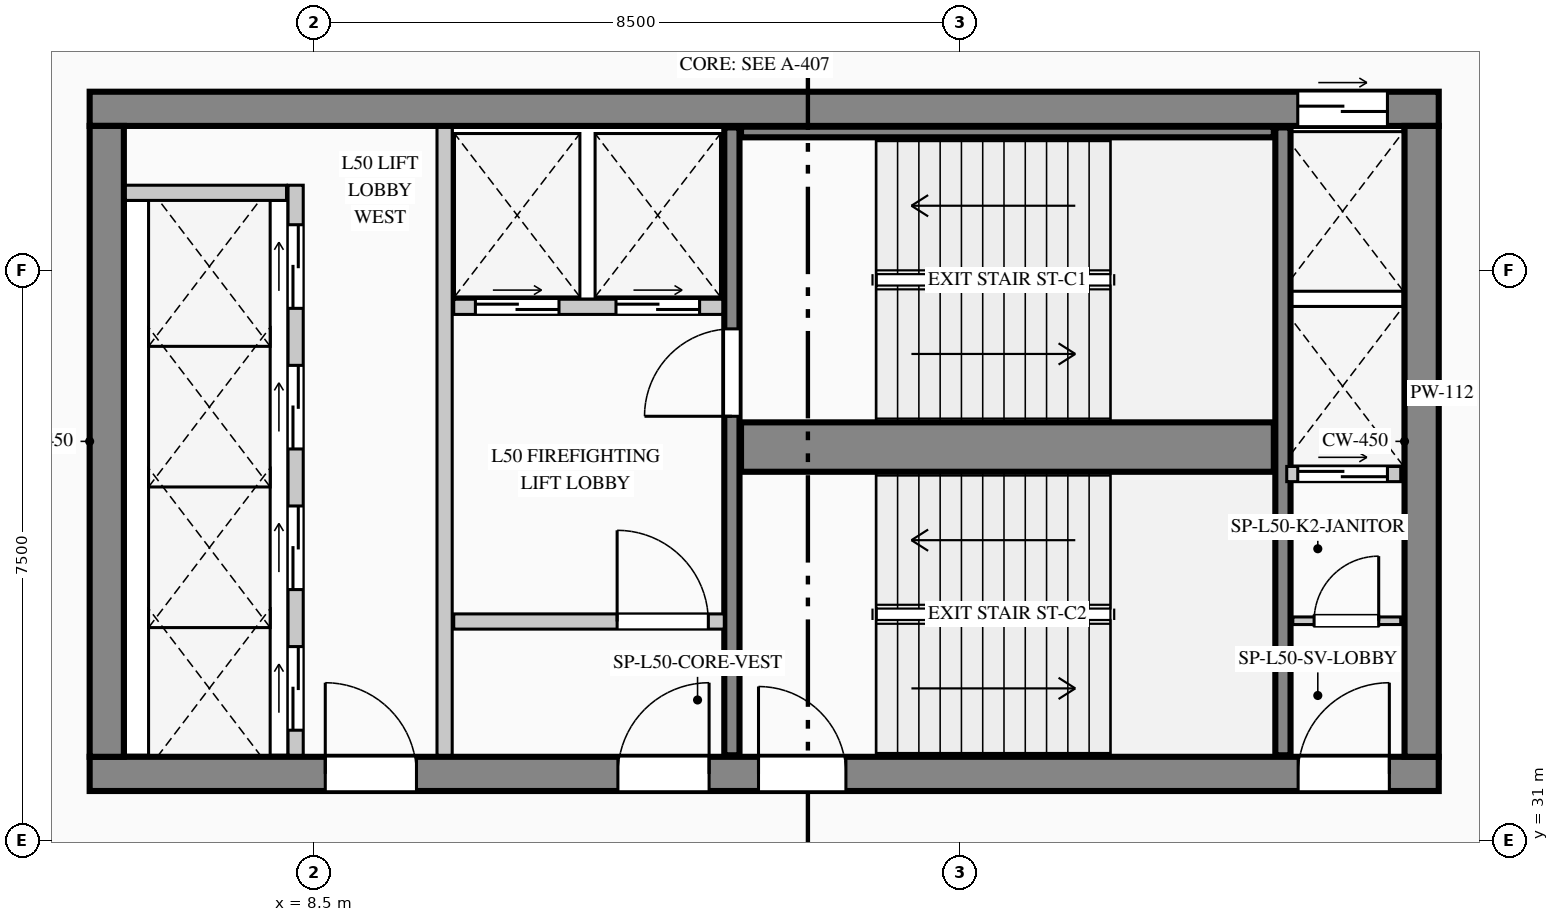
"""IFC4 building model, lengths in metres.
Left out: names, types, materials, properties, quantities, classifications, styles, units other than length and angle.
Written with IfcOpenShell. Run it as: python <this file> out.ifc"""

import sys

from ifc_helpers import new_model, si_unit, direction, frame, frame_2d, origin, place, context, subcontext, project, spatial, rectangle, extrude, element, fill, save


model = new_model("IFC4")
c1 = context("Model", 3, precision=1e-05, world=origin(), true_north=direction((0.0, 1.0)))
c2 = subcontext(c1, "Body", "Model", "MODEL_VIEW")
j1 = project(units=[si_unit("LENGTHUNIT", "METRE"), si_unit("PLANEANGLEUNIT", "RADIAN")], contexts=[c1])
p1 = place(None, origin())
s1 = spatial("IfcSite", under=j1, at=p1, CompositionType="ELEMENT")
p2 = place(p1, origin())
s2 = spatial("IfcBuilding", under=s1, at=p2, CompositionType="ELEMENT")
p3 = place(p2, frame((0.0, 0.0, 211.4)))
s3 = spatial("IfcBuildingStorey", under=s2, at=p3, CompositionType="ELEMENT", Elevation=211.4)
p4 = place(p3, frame((5.55, 40.625, 0.0), z_axis=(0.0, 0.0, 1.0), x_axis=(1.0, 0.0, 0.0)))
e1 = element("IfcWall", 1, at=p4, inside=s3, PredefinedType="SHEAR", context=c2, shape_type="SweptSolid", body=[
    extrude(rectangle(XDim=17.75, YDim=0.45, at=frame_2d((8.875, 0.0))), origin(), (0.0, 0.0, 1.0), 3.95),
])
p5 = place(p4, frame((15.895, 0.0, 0.0)))
e2 = element("IfcOpeningElement", 2, at=p5, cuts=e1, PredefinedType="OPENING", context=c2, shape_type="SweptSolid", body=[
    extrude(rectangle(XDim=1.18, YDim=2.25, at=frame_2d((0.59, 1.125))), frame((0.0, 0.235, 0.0), z_axis=(0.0, -1.0, 0.0), x_axis=(1.0, 0.0, 0.0)), (0.0, 0.0, 1.0), 0.47),
])
p6 = place(p3, frame((5.55, 31.875, 0.0), z_axis=(0.0, 0.0, 1.0), x_axis=(1.0, 0.0, 0.0)))
e3 = element("IfcWall", 3, at=p6, inside=s3, PredefinedType="SHEAR", context=c2, shape_type="SweptSolid", body=[
    extrude(rectangle(XDim=17.75, YDim=0.45, at=frame_2d((8.875, 0.0))), origin(), (0.0, 0.0, 1.0), 3.95),
])
p7 = place(p6, frame((3.1, 0.0, 0.0)))
e4 = element("IfcOpeningElement", 4, at=p7, cuts=e3, PredefinedType="OPENING", context=c2, shape_type="SweptSolid", body=[
    extrude(rectangle(XDim=1.2, YDim=2.2, at=frame_2d((0.6, 1.1))), frame((0.0, 0.235, 0.0), z_axis=(0.0, -1.0, 0.0), x_axis=(1.0, 0.0, 0.0)), (0.0, 0.0, 1.0), 0.47),
])
p8 = place(p6, frame((6.95, 0.0, 0.0)))
e5 = element("IfcOpeningElement", 5, at=p8, cuts=e3, PredefinedType="OPENING", context=c2, shape_type="SweptSolid", body=[
    extrude(rectangle(XDim=1.2, YDim=2.2, at=frame_2d((0.6, 1.1))), frame((0.0, 0.235, 0.0), z_axis=(0.0, -1.0, 0.0), x_axis=(1.0, 0.0, 0.0)), (0.0, 0.0, 1.0), 0.47),
])
p9 = place(p6, frame((8.8, 0.0, 0.0)))
e6 = element("IfcOpeningElement", 6, at=p9, cuts=e3, PredefinedType="OPENING", context=c2, shape_type="SweptSolid", body=[
    extrude(rectangle(XDim=1.15, YDim=2.2, at=frame_2d((0.575, 1.1))), frame((0.0, 0.235, 0.0), z_axis=(0.0, -1.0, 0.0), x_axis=(1.0, 0.0, 0.0)), (0.0, 0.0, 1.0), 0.47),
])
p10 = place(p6, frame((15.9, 0.0, 0.0)))
e7 = element("IfcOpeningElement", 7, at=p10, cuts=e3, PredefinedType="OPENING", context=c2, shape_type="SweptSolid", body=[
    extrude(rectangle(XDim=1.2, YDim=2.2, at=frame_2d((0.6, 1.1))), frame((0.0, 0.235, 0.0), z_axis=(0.0, -1.0, 0.0), x_axis=(1.0, 0.0, 0.0)), (0.0, 0.0, 1.0), 0.47),
])
for number, where, z_axis, x_axis in (
    (8, (5.775, 32.1, 0.0), (0.0, 0.0, 1.0), (0.0, 1.0, 0.0)),
    (9, (23.075, 32.1, 0.0), (0.0, 0.0, 1.0), (0.0, 1.0, 0.0)),
):
    element("IfcWall", number, at=place(p3, frame(where, z_axis=z_axis, x_axis=x_axis)), inside=s3, PredefinedType="SHEAR", context=c2, shape_type="SweptSolid", body=[
        extrude(rectangle(XDim=8.3, YDim=0.45, at=frame_2d((4.15, 0.0))), origin(), (0.0, 0.0, 1.0), 3.95),
    ])
p11 = place(p3, frame((14.0, 32.12, 0.0), z_axis=(0.0, 0.0, 1.0), x_axis=(0.0, 1.0, 0.0)))
e10 = element("IfcWall", 10, at=p11, inside=s3, PredefinedType="SHEAR", context=c2, shape_type="SweptSolid", body=[
    extrude(rectangle(XDim=8.26, YDim=0.2, at=frame_2d((4.13, 0.0))), origin(), (0.0, 0.0, 1.0), 3.95),
])
p12 = place(p11, frame((4.46, 0.0, 0.0)))
e11 = element("IfcOpeningElement", 11, at=p12, cuts=e10, PredefinedType="OPENING", context=c2, shape_type="SweptSolid", body=[
    extrude(rectangle(XDim=1.15, YDim=2.2, at=frame_2d((0.575, 1.1))), frame((0.0, 0.11, 0.0), z_axis=(0.0, -1.0, 0.0), x_axis=(1.0, 0.0, 0.0)), (0.0, 0.0, 1.0), 0.22),
])
p13 = place(p3, frame((14.12, 36.175, 0.0), z_axis=(0.0, 0.0, 1.0), x_axis=(1.0, 0.0, 0.0)))
e12 = element("IfcWall", 12, at=p13, inside=s3, PredefinedType="SHEAR", context=c2, shape_type="SweptSolid", body=[
    extrude(rectangle(XDim=7.01, YDim=0.65, at=frame_2d((3.505, 0.0))), origin(), (0.0, 0.0, 1.0), 3.95),
])
p14 = place(p3, frame((21.25, 32.12, 0.0), z_axis=(0.0, 0.0, 1.0), x_axis=(0.0, 1.0, 0.0)))
e13 = element("IfcWall", 13, at=p14, inside=s3, PredefinedType="SHEAR", context=c2, shape_type="SweptSolid", body=[
    extrude(rectangle(XDim=8.26, YDim=0.2, at=frame_2d((4.13, 0.0))), origin(), (0.0, 0.0, 1.0), 3.95),
])
p15 = place(p3, frame((14.12, 40.32, 0.0), z_axis=(0.0, 0.0, 1.0), x_axis=(1.0, 0.0, 0.0)))
e14 = element("IfcWall", 14, at=p15, inside=s3, PredefinedType="SHEAR", context=c2, shape_type="SweptSolid", body=[
    extrude(rectangle(XDim=7.01, YDim=0.14, at=frame_2d((3.505, 0.0))), origin(), (0.0, 0.0, 1.0), 3.95),
])
p16 = place(p3, frame((7.46, 4.62, 0.0), z_axis=(0.0, 0.0, 1.0), x_axis=(-0.123515576323, 0.992342633573, 0.0)))
e15 = element("IfcWall", 15, at=p16, inside=s3, PredefinedType="STANDARD", context=c2, shape_type="SweptSolid", body=[
    extrude(rectangle(XDim=37.043, YDim=0.24, at=frame_2d((18.522, 0.0))), origin(), (0.0, 0.0, 1.0), 3.7),
])
p17 = place(p16, frame((10.032, 0.0, 0.9)))
e16 = element("IfcOpeningElement", 16, at=p17, cuts=e15, PredefinedType="OPENING", context=c2, shape_type="SweptSolid", body=[
    extrude(rectangle(XDim=2.7, YDim=2.1, at=frame_2d((1.35, 1.05))), frame((0.0, 0.13, 0.0), z_axis=(0.0, -1.0, 0.0), x_axis=(1.0, 0.0, 0.0)), (0.0, 0.0, 1.0), 0.26),
])
p18 = place(p3, frame((8.26, 32.12, 0.0), z_axis=(0.0, 0.0, 1.0), x_axis=(0.0, 1.0, 0.0)))
e17 = element("IfcWall", 17, at=p18, inside=s3, PredefinedType="PARTITIONING", context=c2, shape_type="SweptSolid", body=[
    extrude(rectangle(XDim=7.5, YDim=0.2, at=frame_2d((3.75, 0.0))), origin(), (0.0, 0.0, 1.0), 3.7),
])
p19 = place(p18, frame((0.33, 0.0, 0.0)))
e18 = element("IfcOpeningElement", 18, at=p19, cuts=e17, PredefinedType="OPENING", context=c2, shape_type="SweptSolid", body=[
    extrude(rectangle(XDim=1.1, YDim=2.2, at=frame_2d((0.55, 1.1))), frame((0.0, 0.11, 0.0), z_axis=(0.0, -1.0, 0.0), x_axis=(1.0, 0.0, 0.0)), (0.0, 0.0, 1.0), 0.22),
])
p20 = place(p18, frame((2.18, 0.0, 0.0)))
e19 = element("IfcOpeningElement", 19, at=p20, cuts=e17, PredefinedType="OPENING", context=c2, shape_type="SweptSolid", body=[
    extrude(rectangle(XDim=1.1, YDim=2.2, at=frame_2d((0.55, 1.1))), frame((0.0, 0.11, 0.0), z_axis=(0.0, -1.0, 0.0), x_axis=(1.0, 0.0, 0.0)), (0.0, 0.0, 1.0), 0.22),
])
p21 = place(p18, frame((4.03, 0.0, 0.0)))
e20 = element("IfcOpeningElement", 20, at=p21, cuts=e17, PredefinedType="OPENING", context=c2, shape_type="SweptSolid", body=[
    extrude(rectangle(XDim=1.1, YDim=2.2, at=frame_2d((0.55, 1.1))), frame((0.0, 0.11, 0.0), z_axis=(0.0, -1.0, 0.0), x_axis=(1.0, 0.0, 0.0)), (0.0, 0.0, 1.0), 0.22),
])
p22 = place(p18, frame((5.88, 0.0, 0.0)))
e21 = element("IfcOpeningElement", 21, at=p22, cuts=e17, PredefinedType="OPENING", context=c2, shape_type="SweptSolid", body=[
    extrude(rectangle(XDim=1.1, YDim=2.2, at=frame_2d((0.55, 1.1))), frame((0.0, 0.11, 0.0), z_axis=(0.0, -1.0, 0.0), x_axis=(1.0, 0.0, 0.0)), (0.0, 0.0, 1.0), 0.22),
])
p23 = place(p3, frame((6.02, 39.52, 0.0), z_axis=(0.0, 0.0, 1.0), x_axis=(1.0, 0.0, 0.0)))
e22 = element("IfcWall", 22, at=p23, inside=s3, PredefinedType="PARTITIONING", context=c2, shape_type="SweptSolid", body=[
    extrude(rectangle(XDim=2.12, YDim=0.2, at=frame_2d((1.06, 0.0))), origin(), (0.0, 0.0, 1.0), 3.7),
])
p24 = place(p3, frame((10.22, 32.12, 0.0), z_axis=(0.0, 0.0, 1.0), x_axis=(0.0, 1.0, 0.0)))
e23 = element("IfcWall", 23, at=p24, inside=s3, PredefinedType="PARTITIONING", context=c2, shape_type="SweptSolid", body=[
    extrude(rectangle(XDim=8.26, YDim=0.2, at=frame_2d((4.13, 0.0))), origin(), (0.0, 0.0, 1.0), 3.7),
])
p25 = place(p3, frame((10.34, 38.02, 0.0), z_axis=(0.0, 0.0, 1.0), x_axis=(1.0, 0.0, 0.0)))
e24 = element("IfcWall", 24, at=p25, inside=s3, PredefinedType="PARTITIONING", context=c2, shape_type="SweptSolid", body=[
    extrude(rectangle(XDim=3.54, YDim=0.2, at=frame_2d((1.77, 0.0))), origin(), (0.0, 0.0, 1.0), 3.7),
])
p26 = place(p25, frame((0.285, 0.0, 0.0)))
e25 = element("IfcOpeningElement", 25, at=p26, cuts=e24, PredefinedType="OPENING", context=c2, shape_type="SweptSolid", body=[
    extrude(rectangle(XDim=1.1, YDim=2.2, at=frame_2d((0.55, 1.1))), frame((0.0, 0.11, 0.0), z_axis=(0.0, -1.0, 0.0), x_axis=(1.0, 0.0, 0.0)), (0.0, 0.0, 1.0), 0.22),
])
p27 = place(p25, frame((2.135, 0.0, 0.0)))
e26 = element("IfcOpeningElement", 26, at=p27, cuts=e24, PredefinedType="OPENING", context=c2, shape_type="SweptSolid", body=[
    extrude(rectangle(XDim=1.1, YDim=2.2, at=frame_2d((0.55, 1.1))), frame((0.0, 0.11, 0.0), z_axis=(0.0, -1.0, 0.0), x_axis=(1.0, 0.0, 0.0)), (0.0, 0.0, 1.0), 0.22),
])
p28 = place(p3, frame((10.34, 33.88, 0.0), z_axis=(0.0, 0.0, 1.0), x_axis=(1.0, 0.0, 0.0)))
e27 = element("IfcWall", 27, at=p28, inside=s3, PredefinedType="PARTITIONING", context=c2, shape_type="SweptSolid", body=[
    extrude(rectangle(XDim=3.56, YDim=0.2, at=frame_2d((1.78, 0.0))), origin(), (0.0, 0.0, 1.0), 3.7),
])
p29 = place(p28, frame((2.15, 0.0, 0.0)))
e28 = element("IfcOpeningElement", 28, at=p29, cuts=e27, PredefinedType="OPENING", context=c2, shape_type="SweptSolid", body=[
    extrude(rectangle(XDim=1.2, YDim=2.2, at=frame_2d((0.6, 1.1))), frame((0.0, 0.11, 0.0), z_axis=(0.0, -1.0, 0.0), x_axis=(1.0, 0.0, 0.0)), (0.0, 0.0, 1.0), 0.22),
])
p30 = place(p3, frame((21.38, 33.89, 0.0), z_axis=(0.0, 0.0, 1.0), x_axis=(1.0, 0.0, 0.0)))
e29 = element("IfcWall", 29, at=p30, inside=s3, PredefinedType="PARTITIONING", context=c2, shape_type="SweptSolid", body=[
    extrude(rectangle(XDim=1.42, YDim=0.1, at=frame_2d((0.71, 0.0))), origin(), (0.0, 0.0, 1.0), 3.7),
])
p31 = place(p30, frame((0.28, 0.0, 0.0)))
e30 = element("IfcOpeningElement", 30, at=p31, cuts=e29, PredefinedType="OPENING", context=c2, shape_type="SweptSolid", body=[
    extrude(rectangle(XDim=0.85, YDim=2.1, at=frame_2d((0.425, 1.05))), frame((0.0, 0.06, 0.0), z_axis=(0.0, -1.0, 0.0), x_axis=(1.0, 0.0, 0.0)), (0.0, 0.0, 1.0), 0.12),
])
p32 = place(p3, frame((21.3, 35.82, 0.0), z_axis=(0.0, 0.0, 1.0), x_axis=(1.0, 0.0, 0.0)))
e31 = element("IfcWall", 31, at=p32, inside=s3, PredefinedType="PARTITIONING", context=c2, shape_type="SweptSolid", body=[
    extrude(rectangle(XDim=1.5, YDim=0.2, at=frame_2d((0.75, 0.0))), origin(), (0.0, 0.0, 1.0), 3.7),
])
p33 = place(p32, frame((0.145, 0.0, 0.0)))
e32 = element("IfcOpeningElement", 32, at=p33, cuts=e31, PredefinedType="OPENING", context=c2, shape_type="SweptSolid", body=[
    extrude(rectangle(XDim=1.18, YDim=2.25, at=frame_2d((0.59, 1.125))), frame((0.0, 0.11, 0.0), z_axis=(0.0, -1.0, 0.0), x_axis=(1.0, 0.0, 0.0)), (0.0, 0.0, 1.0), 0.22),
])
p34 = place(p7, origin())
e33 = element("IfcDoor", 33, at=p34, inside=s3, OperationType="SINGLE_SWING_LEFT", PredefinedType="DOOR", context=c2, shape_type="SweptSolid", body=[
    extrude(rectangle(XDim=1.2, YDim=2.2, at=frame_2d((0.6, 1.1))), frame((0.0, 0.025, 0.0), z_axis=(0.0, -1.0, 0.0), x_axis=(1.0, 0.0, 0.0)), (0.0, 0.0, 1.0), 0.05),
])
fill(e4, e33)
p35 = place(p8, origin())
e34 = element("IfcDoor", 34, at=p35, inside=s3, OperationType="SINGLE_SWING_RIGHT", PredefinedType="DOOR", context=c2, shape_type="SweptSolid", body=[
    extrude(rectangle(XDim=1.2, YDim=2.2, at=frame_2d((0.6, 1.1))), frame((0.0, 0.025, 0.0), z_axis=(0.0, -1.0, 0.0), x_axis=(1.0, 0.0, 0.0)), (0.0, 0.0, 1.0), 0.05),
])
fill(e5, e34)
p36 = place(p9, origin())
e35 = element("IfcDoor", 35, at=p36, inside=s3, OperationType="SINGLE_SWING_LEFT", PredefinedType="DOOR", context=c2, shape_type="SweptSolid", body=[
    extrude(rectangle(XDim=1.15, YDim=2.2, at=frame_2d((0.575, 1.1))), frame((0.0, 0.025, 0.0), z_axis=(0.0, -1.0, 0.0), x_axis=(1.0, 0.0, 0.0)), (0.0, 0.0, 1.0), 0.05),
])
fill(e6, e35)
p37 = place(p10, origin())
e36 = element("IfcDoor", 36, at=p37, inside=s3, OperationType="SINGLE_SWING_RIGHT", PredefinedType="DOOR", context=c2, shape_type="SweptSolid", body=[
    extrude(rectangle(XDim=1.2, YDim=2.2, at=frame_2d((0.6, 1.1))), frame((0.0, 0.025, 0.0), z_axis=(0.0, -1.0, 0.0), x_axis=(1.0, 0.0, 0.0)), (0.0, 0.0, 1.0), 0.05),
])
fill(e7, e36)
p38 = place(p29, origin())
e37 = element("IfcDoor", 37, at=p38, inside=s3, OperationType="SINGLE_SWING_LEFT", PredefinedType="DOOR", context=c2, shape_type="SweptSolid", body=[
    extrude(rectangle(XDim=1.2, YDim=2.2, at=frame_2d((0.6, 1.1))), frame((0.0, 0.025, 0.0), z_axis=(0.0, -1.0, 0.0), x_axis=(1.0, 0.0, 0.0)), (0.0, 0.0, 1.0), 0.05),
])
fill(e28, e37)
p39 = place(p31, origin())
e38 = element("IfcDoor", 38, at=p39, inside=s3, OperationType="SINGLE_SWING_RIGHT", PredefinedType="DOOR", context=c2, shape_type="SweptSolid", body=[
    extrude(rectangle(XDim=0.85, YDim=2.1, at=frame_2d((0.425, 1.05))), frame((0.0, 0.025, 0.0), z_axis=(0.0, -1.0, 0.0), x_axis=(1.0, 0.0, 0.0)), (0.0, 0.0, 1.0), 0.05),
])
fill(e30, e38)
p40 = place(p12, origin())
e39 = element("IfcDoor", 39, at=p40, inside=s3, OperationType="SINGLE_SWING_LEFT", PredefinedType="DOOR", context=c2, shape_type="SweptSolid", body=[
    extrude(rectangle(XDim=1.15, YDim=2.2, at=frame_2d((0.575, 1.1))), frame((0.0, 0.025, 0.0), z_axis=(0.0, -1.0, 0.0), x_axis=(1.0, 0.0, 0.0)), (0.0, 0.0, 1.0), 0.05),
])
fill(e11, e39)
p41 = place(p19, origin())
e40 = element("IfcDoor", 40, at=p41, inside=s3, OperationType="DOUBLE_DOOR_SLIDING", PredefinedType="DOOR", context=c2, shape_type="SweptSolid", body=[
    extrude(rectangle(XDim=1.1, YDim=2.2, at=frame_2d((0.55, 1.1))), frame((0.0, 0.025, 0.0), z_axis=(0.0, -1.0, 0.0), x_axis=(1.0, 0.0, 0.0)), (0.0, 0.0, 1.0), 0.05),
])
fill(e18, e40)
p42 = place(p20, origin())
e41 = element("IfcDoor", 41, at=p42, inside=s3, OperationType="DOUBLE_DOOR_SLIDING", PredefinedType="DOOR", context=c2, shape_type="SweptSolid", body=[
    extrude(rectangle(XDim=1.1, YDim=2.2, at=frame_2d((0.55, 1.1))), frame((0.0, 0.025, 0.0), z_axis=(0.0, -1.0, 0.0), x_axis=(1.0, 0.0, 0.0)), (0.0, 0.0, 1.0), 0.05),
])
fill(e19, e41)
p43 = place(p21, origin())
e42 = element("IfcDoor", 42, at=p43, inside=s3, OperationType="DOUBLE_DOOR_SLIDING", PredefinedType="DOOR", context=c2, shape_type="SweptSolid", body=[
    extrude(rectangle(XDim=1.1, YDim=2.2, at=frame_2d((0.55, 1.1))), frame((0.0, 0.025, 0.0), z_axis=(0.0, -1.0, 0.0), x_axis=(1.0, 0.0, 0.0)), (0.0, 0.0, 1.0), 0.05),
])
fill(e20, e42)
p44 = place(p22, origin())
e43 = element("IfcDoor", 43, at=p44, inside=s3, OperationType="DOUBLE_DOOR_SLIDING", PredefinedType="DOOR", context=c2, shape_type="SweptSolid", body=[
    extrude(rectangle(XDim=1.1, YDim=2.2, at=frame_2d((0.55, 1.1))), frame((0.0, 0.025, 0.0), z_axis=(0.0, -1.0, 0.0), x_axis=(1.0, 0.0, 0.0)), (0.0, 0.0, 1.0), 0.05),
])
fill(e21, e43)
p45 = place(p26, origin())
e44 = element("IfcDoor", 44, at=p45, inside=s3, OperationType="DOUBLE_DOOR_SLIDING", PredefinedType="DOOR", context=c2, shape_type="SweptSolid", body=[
    extrude(rectangle(XDim=1.1, YDim=2.2, at=frame_2d((0.55, 1.1))), frame((0.0, 0.025, 0.0), z_axis=(0.0, -1.0, 0.0), x_axis=(1.0, 0.0, 0.0)), (0.0, 0.0, 1.0), 0.05),
])
fill(e25, e44)
p46 = place(p27, origin())
e45 = element("IfcDoor", 45, at=p46, inside=s3, OperationType="DOUBLE_DOOR_SLIDING", PredefinedType="DOOR", context=c2, shape_type="SweptSolid", body=[
    extrude(rectangle(XDim=1.1, YDim=2.2, at=frame_2d((0.55, 1.1))), frame((0.0, 0.025, 0.0), z_axis=(0.0, -1.0, 0.0), x_axis=(1.0, 0.0, 0.0)), (0.0, 0.0, 1.0), 0.05),
])
fill(e26, e45)
p47 = place(p5, origin())
e46 = element("IfcDoor", 46, at=p47, inside=s3, OperationType="DOUBLE_DOOR_SLIDING", PredefinedType="DOOR", context=c2, shape_type="SweptSolid", body=[
    extrude(rectangle(XDim=1.18, YDim=2.25, at=frame_2d((0.59, 1.125))), frame((0.0, 0.025, 0.0), z_axis=(0.0, -1.0, 0.0), x_axis=(1.0, 0.0, 0.0)), (0.0, 0.0, 1.0), 0.05),
])
fill(e2, e46)
p48 = place(p33, origin())
e47 = element("IfcDoor", 47, at=p48, inside=s3, OperationType="DOUBLE_DOOR_SLIDING", PredefinedType="DOOR", context=c2, shape_type="SweptSolid", body=[
    extrude(rectangle(XDim=1.18, YDim=2.25, at=frame_2d((0.59, 1.125))), frame((0.0, 0.025, 0.0), z_axis=(0.0, -1.0, 0.0), x_axis=(1.0, 0.0, 0.0)), (0.0, 0.0, 1.0), 0.05),
])
fill(e32, e47)
save(model, sys.argv[1])
